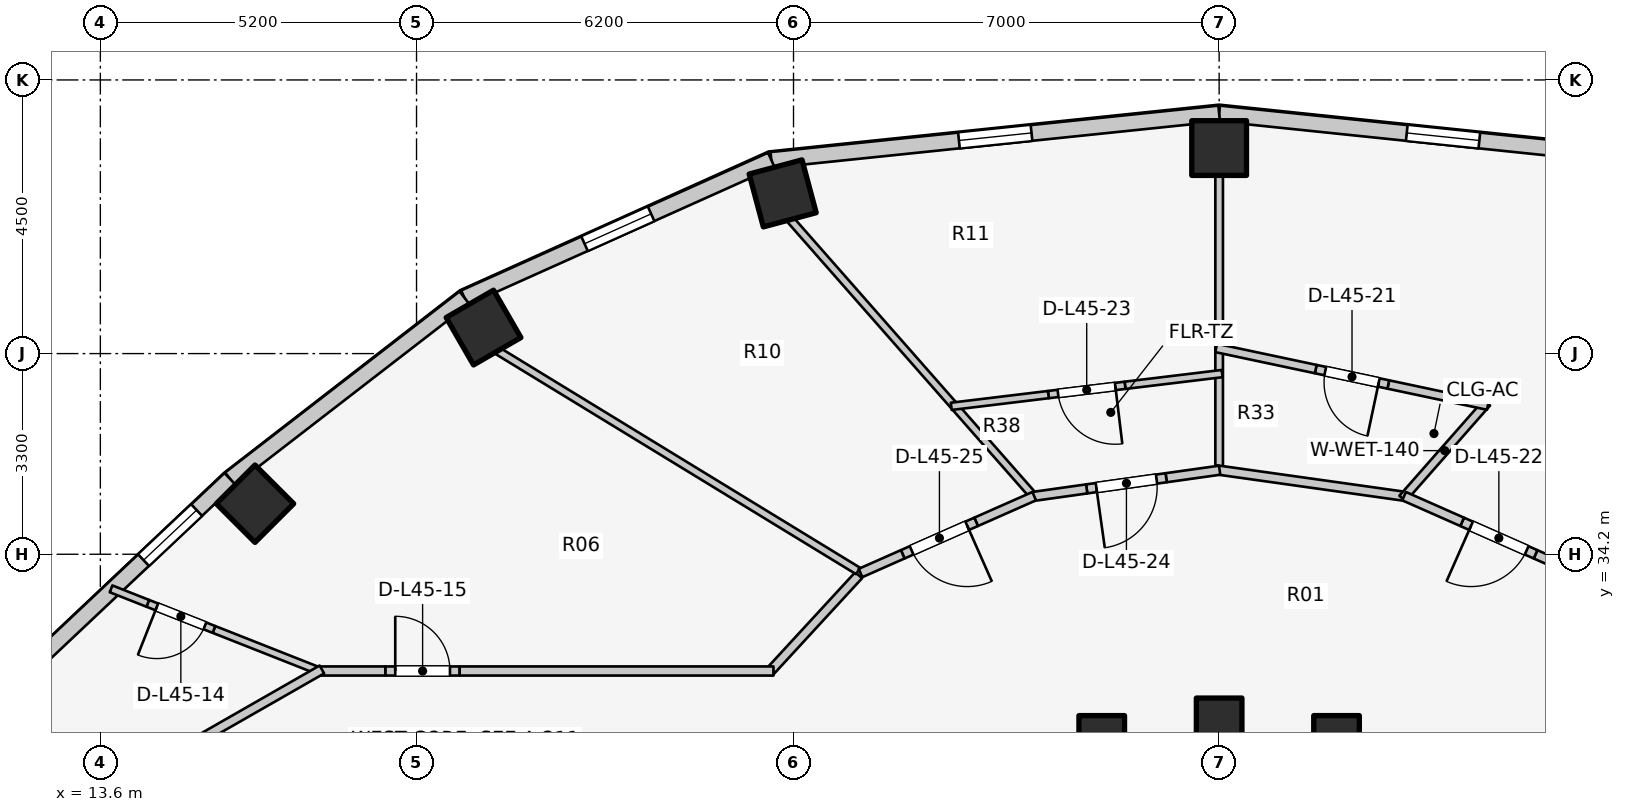
"""IFC4 building model, lengths in metres.
Left out: names, types, materials, properties, quantities, classifications, styles, units other than length and angle.
Written with IfcOpenShell. Run it as: python <this file> out.ifc"""

import sys

from ifc_helpers import new_model, si_unit, direction, frame, frame_2d, origin, origin_2d, place, context, subcontext, project, spatial, rectangle, extrude, element, fill, save


model = new_model("IFC4")
c1 = context("Model", 3, precision=1e-05, world=origin(), true_north=direction((0.0, 1.0)))
c2 = subcontext(c1, "Body", "Model", "MODEL_VIEW")
j1 = project(units=[si_unit("LENGTHUNIT", "METRE"), si_unit("PLANEANGLEUNIT", "RADIAN")], contexts=[c1])
p1 = place(None, origin())
s1 = spatial("IfcSite", under=j1, at=p1, CompositionType="ELEMENT")
p2 = place(p1, origin())
s2 = spatial("IfcBuilding", under=s1, at=p2, CompositionType="ELEMENT")
p3 = place(p2, frame((0.0, 0.0, 149.8)))
s3 = spatial("IfcBuildingStorey", under=s2, at=p3, CompositionType="ELEMENT", Elevation=149.8)
for number, where, z_axis, x_axis in (
    (1, (33.931, 31.172, 0.0), (0.0, 0.0, 1.0), (1.0, 0.0, 0.0)),
    (2, (32.0, 31.46, 0.0), (0.0, 0.0, 1.0), (1.0, 0.0, 0.0)),
):
    element("IfcColumn", number, at=place(p3, frame(where, z_axis=z_axis, x_axis=x_axis)), inside=s3, PredefinedType="COLUMN", context=c2, shape_type="SweptSolid", body=[
        extrude(rectangle(XDim=0.75, YDim=0.75, at=origin_2d()), origin(), (0.0, 0.0, 1.0), 3.1),
    ])
p4 = place(p3, frame((32.0, 40.88, 0.0), z_axis=(0.0, 0.0, 1.0), x_axis=(0.0, 1.0, 0.0)))
e3 = element("IfcColumn", 3, at=p4, inside=s3, PredefinedType="COLUMN", context=c2, shape_type="SweptSolid", body=[
    extrude(rectangle(XDim=0.9, YDim=0.9, at=origin_2d()), origin(), (0.0, 0.0, 1.0), 3.1),
])
p5 = place(p3, frame((30.069, 31.172, 0.0), z_axis=(0.0, 0.0, 1.0), x_axis=(1.0, 0.0, 0.0)))
e4 = element("IfcColumn", 4, at=p5, inside=s3, PredefinedType="COLUMN", context=c2, shape_type="SweptSolid", body=[
    extrude(rectangle(XDim=0.75, YDim=0.75, at=origin_2d()), origin(), (0.0, 0.0, 1.0), 3.1),
])
for number, where, z_axis, x_axis in (
    (5, (24.822, 40.135, 0.0), (0.0, 0.0, 1.0), (-0.259, 0.966, 0.0)),
    (6, (19.902, 37.928, 0.0), (0.0, 0.0, 1.0), (-0.5, 0.866, 0.0)),
    (7, (16.143, 35.031, 0.0), (0.0, 0.0, 1.0), (-0.707, 0.707, 0.0)),
):
    element("IfcColumn", number, at=place(p3, frame(where, z_axis=z_axis, x_axis=x_axis)), inside=s3, PredefinedType="COLUMN", context=c2, shape_type="SweptSolid", body=[
        extrude(rectangle(XDim=0.9, YDim=0.9, at=origin_2d()), origin(), (0.0, 0.0, 1.0), 3.1),
    ])
p6 = place(p3, frame((39.365, 40.685, 0.0), z_axis=(0.0, 0.0, 1.0), x_axis=(-0.994664178965, 0.10316574569, 0.0)))
e8 = element("IfcWall", 8, at=p6, inside=s3, PredefinedType="STANDARD", context=c2, shape_type="SweptSolid", body=[
    extrude(rectangle(XDim=7.405, YDim=0.26, at=frame_2d((3.702, 0.0))), origin(), (0.0, 0.0, 1.0), 1.22),
])
p7 = place(p6, frame((3.102, 0.0, 0.15)))
e9 = element("IfcOpeningElement", 9, at=p7, cuts=e8, PredefinedType="OPENING", context=c2, shape_type="SweptSolid", body=[
    extrude(rectangle(XDim=1.2, YDim=0.9, at=frame_2d((0.6, 0.45))), frame((0.0, 0.14, 0.0), z_axis=(0.0, -1.0, 0.0), x_axis=(1.0, 0.0, 0.0)), (0.0, 0.0, 1.0), 0.28),
])
p8 = place(p3, frame((32.0, 41.448, 0.0), z_axis=(0.0, 0.0, 1.0), x_axis=(-0.994664178965, -0.10316574569, 0.0)))
e10 = element("IfcWall", 10, at=p8, inside=s3, PredefinedType="STANDARD", context=c2, shape_type="SweptSolid", body=[
    extrude(rectangle(XDim=7.405, YDim=0.26, at=frame_2d((3.702, 0.0))), origin(), (0.0, 0.0, 1.0), 1.22),
])
p9 = place(p8, frame((3.102, 0.0, 0.15)))
e11 = element("IfcOpeningElement", 11, at=p9, cuts=e10, PredefinedType="OPENING", context=c2, shape_type="SweptSolid", body=[
    extrude(rectangle(XDim=1.2, YDim=0.9, at=frame_2d((0.6, 0.45))), frame((0.0, 0.14, 0.0), z_axis=(0.0, -1.0, 0.0), x_axis=(1.0, 0.0, 0.0)), (0.0, 0.0, 1.0), 0.28),
])
p10 = place(p3, frame((24.635, 40.685, 0.0), z_axis=(0.0, 0.0, 1.0), x_axis=(-0.912353637112, -0.409403029847, 0.0)))
e12 = element("IfcWall", 12, at=p10, inside=s3, PredefinedType="STANDARD", context=c2, shape_type="SweptSolid", body=[
    extrude(rectangle(XDim=5.533, YDim=0.26, at=frame_2d((2.766, 0.0))), origin(), (0.0, 0.0, 1.0), 1.22),
])
p11 = place(p10, frame((2.167, 0.0, 0.15)))
e13 = element("IfcOpeningElement", 13, at=p11, cuts=e12, PredefinedType="OPENING", context=c2, shape_type="SweptSolid", body=[
    extrude(rectangle(XDim=1.2, YDim=0.9, at=frame_2d((0.6, 0.45))), frame((0.0, 0.14, 0.0), z_axis=(0.0, -1.0, 0.0), x_axis=(1.0, 0.0, 0.0)), (0.0, 0.0, 1.0), 0.28),
])
p12 = place(p3, frame((19.587, 38.419, 0.0), z_axis=(0.0, 0.0, 1.0), x_axis=(-0.791460185804, -0.611220724687, 0.0)))
e14 = element("IfcWall", 14, at=p12, inside=s3, PredefinedType="STANDARD", context=c2, shape_type="SweptSolid", body=[
    extrude(rectangle(XDim=4.872, YDim=0.26, at=frame_2d((2.436, 0.0))), origin(), (0.0, 0.0, 1.0), 1.22),
])
p13 = place(p3, frame((15.731, 35.441, 0.0), z_axis=(0.0, 0.0, 1.0), x_axis=(-0.727667301037, -0.68593024354, 0.0)))
e15 = element("IfcWall", 15, at=p13, inside=s3, PredefinedType="STANDARD", context=c2, shape_type="SweptSolid", body=[
    extrude(rectangle(XDim=4.604, YDim=0.26, at=frame_2d((2.302, 0.0))), origin(), (0.0, 0.0, 1.0), 1.22),
])
p14 = place(p13, frame((0.751, 0.0, 0.15)))
e16 = element("IfcOpeningElement", 16, at=p14, cuts=e15, PredefinedType="OPENING", context=c2, shape_type="SweptSolid", body=[
    extrude(rectangle(XDim=1.2, YDim=0.9, at=frame_2d((0.6, 0.45))), frame((0.0, 0.14, 0.0), z_axis=(0.0, -1.0, 0.0), x_axis=(1.0, 0.0, 0.0)), (0.0, 0.0, 1.0), 0.28),
])
p15 = place(p3, frame((17.247, 32.262, 0.0), z_axis=(0.0, 0.0, 1.0), x_axis=(-0.930227502765, 0.36698336897, 0.0)))
e17 = element("IfcWall", 17, at=p15, inside=s3, PredefinedType="MOVABLE", context=c2, shape_type="SweptSolid", body=[
    extrude(rectangle(XDim=1.912, YDim=0.12, at=frame_2d((0.956, 0.0))), origin(), (0.0, 0.0, 1.0), 1.22),
])
p16 = place(p3, frame((15.468, 32.963, 0.0), z_axis=(0.0, 0.0, 1.0), x_axis=(-0.93017960314, 0.367104761482, 0.0)))
e18 = element("IfcWall", 18, at=p16, inside=s3, PredefinedType="MOVABLE", context=c2, shape_type="SweptSolid", body=[
    extrude(rectangle(XDim=1.17, YDim=0.12, at=frame_2d((0.585, 0.0))), origin(), (0.0, 0.0, 1.0), 2.11),
])
p17 = place(p16, frame((0.16, 0.0, 0.0)))
e19 = element("IfcOpeningElement", 19, at=p17, cuts=e18, PredefinedType="OPENING", context=c2, shape_type="SweptSolid", body=[
    extrude(rectangle(XDim=0.85, YDim=2.05, at=frame_2d((0.425, 1.025))), frame((0.0, 0.07, 0.0), z_axis=(0.0, -1.0, 0.0), x_axis=(1.0, 0.0, 0.0)), (0.0, 0.0, 1.0), 0.14),
])
p18 = place(p3, frame((14.38, 33.393, 0.0), z_axis=(0.0, 0.0, 1.0), x_axis=(-0.9301788827, 0.367106586945, 0.0)))
e20 = element("IfcWall", 20, at=p18, inside=s3, PredefinedType="MOVABLE", context=c2, shape_type="SweptSolid", body=[
    extrude(rectangle(XDim=0.649, YDim=0.12, at=frame_2d((0.325, 0.0))), origin(), (0.0, 0.0, 1.0), 2.575),
])
p19 = place(p3, frame((26.072, 33.856, 0.0), z_axis=(0.0, 0.0, 1.0), x_axis=(-0.677579737957, -0.735449317567, 0.0)))
e21 = element("IfcWall", 21, at=p19, inside=s3, PredefinedType="PARTITIONING", context=c2, shape_type="SweptSolid", body=[
    extrude(rectangle(XDim=2.173, YDim=0.15, at=frame_2d((1.086, 0.0))), origin(), (0.0, 0.0, 1.0), 2.019),
])
p20 = place(p3, frame((17.15, 32.28, 0.0), z_axis=(0.0, 0.0, 1.0), x_axis=(1.0, 0.0, 0.0)))
e22 = element("IfcWall", 22, at=p20, inside=s3, PredefinedType="PARTITIONING", context=c2, shape_type="SweptSolid", body=[
    extrude(rectangle(XDim=1.14, YDim=0.15, at=frame_2d((0.57, 0.0))), origin(), (0.0, 0.0, 1.0), 2.575),
])
p21 = place(p3, frame((18.29, 32.28, 0.0), z_axis=(0.0, 0.0, 1.0), x_axis=(1.0, 0.0, 0.0)))
e23 = element("IfcWall", 23, at=p21, inside=s3, PredefinedType="PARTITIONING", context=c2, shape_type="SweptSolid", body=[
    extrude(rectangle(XDim=1.22, YDim=0.15, at=frame_2d((0.61, 0.0))), origin(), (0.0, 0.0, 1.0), 2.575),
])
p22 = place(p21, frame((0.16, 0.0, 0.0)))
e24 = element("IfcOpeningElement", 24, at=p22, cuts=e23, PredefinedType="OPENING", context=c2, shape_type="SweptSolid", body=[
    extrude(rectangle(XDim=0.9, YDim=2.1, at=frame_2d((0.45, 1.05))), frame((0.0, 0.085, 0.0), z_axis=(0.0, -1.0, 0.0), x_axis=(1.0, 0.0, 0.0)), (0.0, 0.0, 1.0), 0.17),
])
p23 = place(p3, frame((19.51, 32.28, 0.0), z_axis=(0.0, 0.0, 1.0), x_axis=(1.0, 0.0, 0.0)))
e25 = element("IfcWall", 25, at=p23, inside=s3, PredefinedType="PARTITIONING", context=c2, shape_type="SweptSolid", body=[
    extrude(rectangle(XDim=5.16, YDim=0.15, at=frame_2d((2.58, 0.0))), origin(), (0.0, 0.0, 1.0), 2.019),
])
p24 = place(p3, frame((17.243, 32.305, 0.0), z_axis=(0.0, 0.0, 1.0), x_axis=(-0.867991349648, -0.496579315857, 0.0)))
e26 = element("IfcWall", 26, at=p24, inside=s3, PredefinedType="PARTITIONING", context=c2, shape_type="SweptSolid", body=[
    extrude(rectangle(XDim=2.567, YDim=0.15, at=frame_2d((1.283, 0.0))), origin(), (0.0, 0.0, 1.0), 1.22),
])
p25 = place(p3, frame((32.0, 35.637, 0.0), z_axis=(0.0, 0.0, 1.0), x_axis=(0.0, 1.0, 0.0)))
e27 = element("IfcWall", 27, at=p25, inside=s3, PredefinedType="PARTITIONING", context=c2, shape_type="SweptSolid", body=[
    extrude(rectangle(XDim=4.813, YDim=0.125, at=frame_2d((2.406, 0.0))), origin(), (0.0, 0.0, 1.0), 1.22),
])
p26 = place(p3, frame((28.914, 35.195, 0.0), z_axis=(0.0, 0.0, 1.0), x_axis=(-0.660581320981, 0.750754499401, 0.0)))
e28 = element("IfcWall", 28, at=p26, inside=s3, PredefinedType="PARTITIONING", context=c2, shape_type="SweptSolid", body=[
    extrude(rectangle(XDim=6.027, YDim=0.125, at=frame_2d((3.013, 0.0))), origin(), (0.0, 0.0, 1.0), 1.22),
])
p27 = place(p3, frame((26.062, 33.925, 0.0), z_axis=(0.0, 0.0, 1.0), x_axis=(-0.853440334679, 0.521190555501, 0.0)))
e29 = element("IfcWall", 29, at=p27, inside=s3, PredefinedType="PARTITIONING", context=c2, shape_type="SweptSolid", body=[
    extrude(rectangle(XDim=6.966, YDim=0.125, at=frame_2d((3.483, 0.0))), origin(), (0.0, 0.0, 1.0), 1.22),
])
p28 = place(p3, frame((35.099, 35.146, 0.0), z_axis=(0.0, 0.0, 1.0), x_axis=(-0.990251283702, 0.139292480508, 0.0)))
e30 = element("IfcWall", 30, at=p28, inside=s3, PredefinedType="PARTITIONING", context=c2, shape_type="SweptSolid", body=[
    extrude(rectangle(XDim=3.179, YDim=0.15, at=frame_2d((1.59, 0.0))), origin(), (0.0, 0.0, 1.0), 2.019),
])
p29 = place(p3, frame((35.016, 35.116, 0.0), z_axis=(0.0, 0.0, 1.0), x_axis=(0.660559753652, 0.750773475727, 0.0)))
e31 = element("IfcWall", 31, at=p29, inside=s3, PredefinedType="PLUMBINGWALL", context=c2, shape_type="SweptSolid", body=[
    extrude(rectangle(XDim=2.1, YDim=0.14, at=frame_2d((1.05, 0.0))), origin(), (0.0, 0.0, 1.0), 2.105),
])
p30 = place(p3, frame((36.419, 36.644, 0.0), z_axis=(0.0, 0.0, 1.0), x_axis=(-0.978225152663, 0.207546502496, 0.0)))
e32 = element("IfcWall", 32, at=p30, inside=s3, PredefinedType="PLUMBINGWALL", context=c2, shape_type="SweptSolid", body=[
    extrude(rectangle(XDim=1.674, YDim=0.14, at=frame_2d((0.837, 0.0))), origin(), (0.0, 0.0, 1.0), 2.575),
])
p31 = place(p3, frame((34.782, 36.992, 0.0), z_axis=(0.0, 0.0, 1.0), x_axis=(-0.97818732348, 0.20772472213, 0.0)))
e33 = element("IfcWall", 33, at=p31, inside=s3, PredefinedType="PLUMBINGWALL", context=c2, shape_type="SweptSolid", body=[
    extrude(rectangle(XDim=1.22, YDim=0.14, at=frame_2d((0.61, 0.0))), origin(), (0.0, 0.0, 1.0), 2.575),
])
p32 = place(p31, frame((0.16, 0.0, 0.0)))
e34 = element("IfcOpeningElement", 34, at=p32, cuts=e33, PredefinedType="OPENING", context=c2, shape_type="SweptSolid", body=[
    extrude(rectangle(XDim=0.9, YDim=2.1, at=frame_2d((0.45, 1.05))), frame((0.0, 0.08, 0.0), z_axis=(0.0, -1.0, 0.0), x_axis=(1.0, 0.0, 0.0)), (0.0, 0.0, 1.0), 0.16),
])
p33 = place(p3, frame((33.589, 37.245, 0.0), z_axis=(0.0, 0.0, 1.0), x_axis=(-0.978254755399, 0.207406927416, 0.0)))
e35 = element("IfcWall", 35, at=p33, inside=s3, PredefinedType="PLUMBINGWALL", context=c2, shape_type="SweptSolid", body=[
    extrude(rectangle(XDim=1.674, YDim=0.14, at=frame_2d((0.837, 0.0))), origin(), (0.0, 0.0, 1.0), 2.019),
])
p34 = place(p3, frame((37.898, 33.892, 0.0), z_axis=(0.0, 0.0, 1.0), x_axis=(-0.914526186943, 0.404526702945, 0.0)))
e36 = element("IfcWall", 36, at=p34, inside=s3, PredefinedType="PARTITIONING", context=c2, shape_type="SweptSolid", body=[
    extrude(rectangle(XDim=0.759, YDim=0.15, at=frame_2d((0.38, 0.0))), origin(), (0.0, 0.0, 1.0), 2.575),
])
p35 = place(p3, frame((37.204, 34.199, 0.0), z_axis=(0.0, 0.0, 1.0), x_axis=(-0.914549810084, 0.404473293155, 0.0)))
e37 = element("IfcWall", 37, at=p35, inside=s3, PredefinedType="PARTITIONING", context=c2, shape_type="SweptSolid", body=[
    extrude(rectangle(XDim=1.32, YDim=0.15, at=frame_2d((0.66, 0.0))), origin(), (0.0, 0.0, 1.0), 2.16),
])
p36 = place(p35, frame((0.16, 0.0, 0.0)))
e38 = element("IfcOpeningElement", 38, at=p36, cuts=e37, PredefinedType="OPENING", context=c2, shape_type="SweptSolid", body=[
    extrude(rectangle(XDim=1.0, YDim=2.1, at=frame_2d((0.5, 1.05))), frame((0.0, 0.085, 0.0), z_axis=(0.0, -1.0, 0.0), x_axis=(1.0, 0.0, 0.0)), (0.0, 0.0, 1.0), 0.17),
])
p37 = place(p3, frame((35.997, 34.733, 0.0), z_axis=(0.0, 0.0, 1.0), x_axis=(-0.914475459316, 0.40464136505, 0.0)))
e39 = element("IfcWall", 39, at=p37, inside=s3, PredefinedType="PARTITIONING", context=c2, shape_type="SweptSolid", body=[
    extrude(rectangle(XDim=1.044, YDim=0.15, at=frame_2d((0.522, 0.0))), origin(), (0.0, 0.0, 1.0), 2.019),
])
p38 = place(p3, frame((32.05, 37.171, 0.0), z_axis=(0.0, 0.0, 1.0), x_axis=(-0.992769444963, -0.120036782477, 0.0)))
e40 = element("IfcWall", 40, at=p38, inside=s3, PredefinedType="MOVABLE", context=c2, shape_type="SweptSolid", body=[
    extrude(rectangle(XDim=1.609, YDim=0.12, at=frame_2d((0.804, 0.0))), origin(), (0.0, 0.0, 1.0), 2.019),
])
p39 = place(p3, frame((30.452, 36.978, 0.0), z_axis=(0.0, 0.0, 1.0), x_axis=(-0.992758113942, -0.120130459093, 0.0)))
e41 = element("IfcWall", 41, at=p39, inside=s3, PredefinedType="MOVABLE", context=c2, shape_type="SweptSolid", body=[
    extrude(rectangle(XDim=1.27, YDim=0.12, at=frame_2d((0.635, 0.0))), origin(), (0.0, 0.0, 1.0), 2.575),
])
p40 = place(p39, frame((0.16, 0.0, 0.0)))
e42 = element("IfcOpeningElement", 42, at=p40, cuts=e41, PredefinedType="OPENING", context=c2, shape_type="SweptSolid", body=[
    extrude(rectangle(XDim=0.95, YDim=2.1, at=frame_2d((0.475, 1.05))), frame((0.0, 0.07, 0.0), z_axis=(0.0, -1.0, 0.0), x_axis=(1.0, 0.0, 0.0)), (0.0, 0.0, 1.0), 0.14),
])
p41 = place(p3, frame((29.191, 36.826, 0.0), z_axis=(0.0, 0.0, 1.0), x_axis=(-0.992751349772, -0.120186345005, 0.0)))
e43 = element("IfcWall", 43, at=p41, inside=s3, PredefinedType="MOVABLE", context=c2, shape_type="SweptSolid", body=[
    extrude(rectangle(XDim=1.609, YDim=0.12, at=frame_2d((0.804, 0.0))), origin(), (0.0, 0.0, 1.0), 2.575),
])
p42 = place(p3, frame((32.008, 35.582, 0.0), z_axis=(0.0, 0.0, 1.0), x_axis=(-0.990276708961, -0.139111608755, 0.0)))
e44 = element("IfcWall", 44, at=p42, inside=s3, PredefinedType="PARTITIONING", context=c2, shape_type="SweptSolid", body=[
    extrude(rectangle(XDim=0.888, YDim=0.15, at=frame_2d((0.444, 0.0))), origin(), (0.0, 0.0, 1.0), 2.019),
])
p43 = place(p3, frame((31.129, 35.458, 0.0), z_axis=(0.0, 0.0, 1.0), x_axis=(-0.990254187593, -0.139271834751, 0.0)))
e45 = element("IfcWall", 45, at=p43, inside=s3, PredefinedType="PARTITIONING", context=c2, shape_type="SweptSolid", body=[
    extrude(rectangle(XDim=1.32, YDim=0.15, at=frame_2d((0.66, 0.0))), origin(), (0.0, 0.0, 1.0), 2.575),
])
p44 = place(p43, frame((0.16, 0.0, 0.0)))
e46 = element("IfcOpeningElement", 46, at=p44, cuts=e45, PredefinedType="OPENING", context=c2, shape_type="SweptSolid", body=[
    extrude(rectangle(XDim=1.0, YDim=2.1, at=frame_2d((0.5, 1.05))), frame((0.0, 0.085, 0.0), z_axis=(0.0, -1.0, 0.0), x_axis=(1.0, 0.0, 0.0)), (0.0, 0.0, 1.0), 0.17),
])
p45 = place(p3, frame((29.822, 35.275, 0.0), z_axis=(0.0, 0.0, 1.0), x_axis=(-0.990233457483, -0.139419151054, 0.0)))
e47 = element("IfcWall", 47, at=p45, inside=s3, PredefinedType="PARTITIONING", context=c2, shape_type="SweptSolid", body=[
    extrude(rectangle(XDim=0.888, YDim=0.15, at=frame_2d((0.444, 0.0))), origin(), (0.0, 0.0, 1.0), 2.575),
])
p46 = place(p3, frame((28.958, 35.156, 0.0), z_axis=(0.0, 0.0, 1.0), x_axis=(-0.914475459316, -0.40464136505, 0.0)))
e48 = element("IfcWall", 48, at=p46, inside=s3, PredefinedType="PARTITIONING", context=c2, shape_type="SweptSolid", body=[
    extrude(rectangle(XDim=1.044, YDim=0.15, at=frame_2d((0.522, 0.0))), origin(), (0.0, 0.0, 1.0), 2.019),
])
p47 = place(p3, frame((28.003, 34.733, 0.0), z_axis=(0.0, 0.0, 1.0), x_axis=(-0.914549810084, -0.404473293155, 0.0)))
e49 = element("IfcWall", 49, at=p47, inside=s3, PredefinedType="PARTITIONING", context=c2, shape_type="SweptSolid", body=[
    extrude(rectangle(XDim=1.32, YDim=0.15, at=frame_2d((0.66, 0.0))), origin(), (0.0, 0.0, 1.0), 2.16),
])
p48 = place(p47, frame((0.16, 0.0, 0.0)))
e50 = element("IfcOpeningElement", 50, at=p48, cuts=e49, PredefinedType="OPENING", context=c2, shape_type="SweptSolid", body=[
    extrude(rectangle(XDim=1.0, YDim=2.1, at=frame_2d((0.5, 1.05))), frame((0.0, 0.085, 0.0), z_axis=(0.0, -1.0, 0.0), x_axis=(1.0, 0.0, 0.0)), (0.0, 0.0, 1.0), 0.17),
])
p49 = place(p3, frame((26.796, 34.199, 0.0), z_axis=(0.0, 0.0, 1.0), x_axis=(-0.914526186943, -0.404526702945, 0.0)))
e51 = element("IfcWall", 51, at=p49, inside=s3, PredefinedType="PARTITIONING", context=c2, shape_type="SweptSolid", body=[
    extrude(rectangle(XDim=0.759, YDim=0.15, at=frame_2d((0.38, 0.0))), origin(), (0.0, 0.0, 1.0), 2.575),
])
p50 = place(p7, origin())
e52 = element("IfcWindow", 52, at=p50, inside=s3, PartitioningType="SINGLE_PANEL", PredefinedType="WINDOW", context=c2, shape_type="SweptSolid", body=[
    extrude(rectangle(XDim=1.2, YDim=0.9, at=frame_2d((0.6, 0.45))), frame((0.0, 0.03, 0.0), z_axis=(0.0, -1.0, 0.0), x_axis=(1.0, 0.0, 0.0)), (0.0, 0.0, 1.0), 0.06),
])
fill(e9, e52)
p51 = place(p9, origin())
e53 = element("IfcWindow", 53, at=p51, inside=s3, PartitioningType="SINGLE_PANEL", PredefinedType="WINDOW", context=c2, shape_type="SweptSolid", body=[
    extrude(rectangle(XDim=1.2, YDim=0.9, at=frame_2d((0.6, 0.45))), frame((0.0, 0.03, 0.0), z_axis=(0.0, -1.0, 0.0), x_axis=(1.0, 0.0, 0.0)), (0.0, 0.0, 1.0), 0.06),
])
fill(e11, e53)
p52 = place(p11, origin())
e54 = element("IfcWindow", 54, at=p52, inside=s3, PartitioningType="SINGLE_PANEL", PredefinedType="WINDOW", context=c2, shape_type="SweptSolid", body=[
    extrude(rectangle(XDim=1.2, YDim=0.9, at=frame_2d((0.6, 0.45))), frame((0.0, 0.03, 0.0), z_axis=(0.0, -1.0, 0.0), x_axis=(1.0, 0.0, 0.0)), (0.0, 0.0, 1.0), 0.06),
])
fill(e13, e54)
p53 = place(p14, origin())
e55 = element("IfcWindow", 55, at=p53, inside=s3, PartitioningType="SINGLE_PANEL", PredefinedType="WINDOW", context=c2, shape_type="SweptSolid", body=[
    extrude(rectangle(XDim=1.2, YDim=0.9, at=frame_2d((0.6, 0.45))), frame((0.0, 0.03, 0.0), z_axis=(0.0, -1.0, 0.0), x_axis=(1.0, 0.0, 0.0)), (0.0, 0.0, 1.0), 0.06),
])
fill(e16, e55)
p54 = place(p17, origin())
e56 = element("IfcDoor", 56, at=p54, inside=s3, OperationType="SINGLE_SWING_RIGHT", PredefinedType="DOOR", context=c2, shape_type="SweptSolid", body=[
    extrude(rectangle(XDim=0.85, YDim=2.05, at=frame_2d((0.425, 1.025))), frame((0.0, 0.025, 0.0), z_axis=(0.0, -1.0, 0.0), x_axis=(1.0, 0.0, 0.0)), (0.0, 0.0, 1.0), 0.05),
])
fill(e19, e56)
p55 = place(p22, origin())
e57 = element("IfcDoor", 57, at=p55, inside=s3, OperationType="SINGLE_SWING_LEFT", PredefinedType="DOOR", context=c2, shape_type="SweptSolid", body=[
    extrude(rectangle(XDim=0.9, YDim=2.1, at=frame_2d((0.45, 1.05))), frame((0.0, 0.025, 0.0), z_axis=(0.0, -1.0, 0.0), x_axis=(1.0, 0.0, 0.0)), (0.0, 0.0, 1.0), 0.05),
])
fill(e24, e57)
p56 = place(p32, origin())
e58 = element("IfcDoor", 58, at=p56, inside=s3, OperationType="SINGLE_SWING_LEFT", PredefinedType="DOOR", context=c2, shape_type="SweptSolid", body=[
    extrude(rectangle(XDim=0.9, YDim=2.1, at=frame_2d((0.45, 1.05))), frame((0.0, 0.025, 0.0), z_axis=(0.0, -1.0, 0.0), x_axis=(1.0, 0.0, 0.0)), (0.0, 0.0, 1.0), 0.05),
])
fill(e34, e58)
p57 = place(p36, origin())
e59 = element("IfcDoor", 59, at=p57, inside=s3, OperationType="SINGLE_SWING_RIGHT", PredefinedType="DOOR", context=c2, shape_type="SweptSolid", body=[
    extrude(rectangle(XDim=1.0, YDim=2.1, at=frame_2d((0.5, 1.05))), frame((0.0, 0.025, 0.0), z_axis=(0.0, -1.0, 0.0), x_axis=(1.0, 0.0, 0.0)), (0.0, 0.0, 1.0), 0.05),
])
fill(e38, e59)
p58 = place(p40, origin())
e60 = element("IfcDoor", 60, at=p58, inside=s3, OperationType="SINGLE_SWING_LEFT", PredefinedType="DOOR", context=c2, shape_type="SweptSolid", body=[
    extrude(rectangle(XDim=0.95, YDim=2.1, at=frame_2d((0.475, 1.05))), frame((0.0, 0.025, 0.0), z_axis=(0.0, -1.0, 0.0), x_axis=(1.0, 0.0, 0.0)), (0.0, 0.0, 1.0), 0.05),
])
fill(e42, e60)
p59 = place(p44, origin())
e61 = element("IfcDoor", 61, at=p59, inside=s3, OperationType="SINGLE_SWING_RIGHT", PredefinedType="DOOR", context=c2, shape_type="SweptSolid", body=[
    extrude(rectangle(XDim=1.0, YDim=2.1, at=frame_2d((0.5, 1.05))), frame((0.0, 0.025, 0.0), z_axis=(0.0, -1.0, 0.0), x_axis=(1.0, 0.0, 0.0)), (0.0, 0.0, 1.0), 0.05),
])
fill(e46, e61)
p60 = place(p48, origin())
e62 = element("IfcDoor", 62, at=p60, inside=s3, OperationType="SINGLE_SWING_LEFT", PredefinedType="DOOR", context=c2, shape_type="SweptSolid", body=[
    extrude(rectangle(XDim=1.0, YDim=2.1, at=frame_2d((0.5, 1.05))), frame((0.0, 0.025, 0.0), z_axis=(0.0, -1.0, 0.0), x_axis=(1.0, 0.0, 0.0)), (0.0, 0.0, 1.0), 0.05),
])
fill(e50, e62)
save(model, sys.argv[1])
